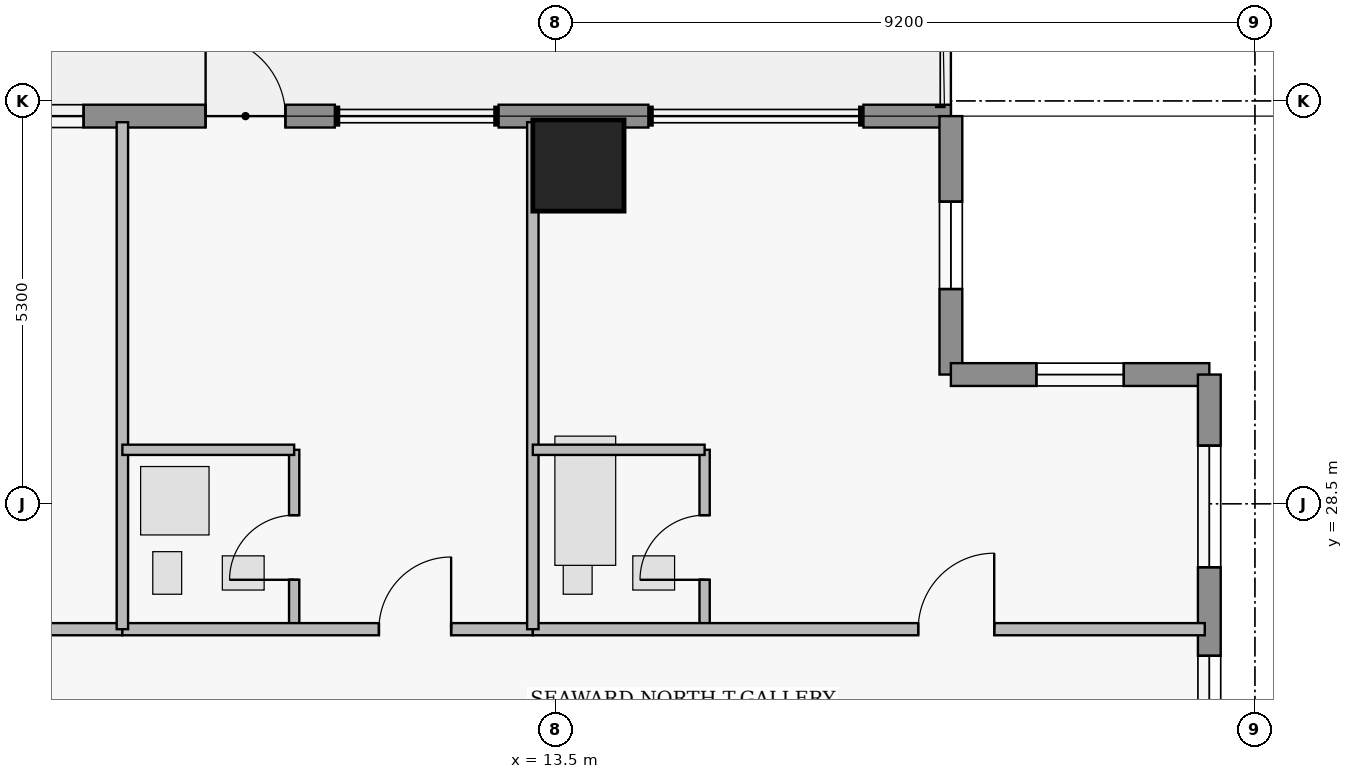
"""IFC4 building model, lengths in metres.
Left out: names, types, materials, properties, quantities, classifications, styles, units other than length and angle.
Written with IfcOpenShell. Run it as: python <this file> out.ifc"""

import sys

from ifc_helpers import new_model, si_unit, direction, frame, frame_2d, origin, origin_2d, place, context, subcontext, project, spatial, rectangle, extrude, element, fill, save


model = new_model("IFC4")
c1 = context("Model", 3, precision=1e-05, world=origin(), true_north=direction((0.0, 1.0)))
c2 = subcontext(c1, "Body", "Model", "MODEL_VIEW")
j1 = project(units=[si_unit("LENGTHUNIT", "METRE"), si_unit("PLANEANGLEUNIT", "RADIAN")], contexts=[c1])
p1 = place(None, origin())
s1 = spatial("IfcSite", under=j1, at=p1, CompositionType="ELEMENT")
p2 = place(p1, origin())
s2 = spatial("IfcBuilding", under=s1, at=p2, CompositionType="ELEMENT")
p3 = place(p2, frame((0.0, 0.0, 199.9)))
s3 = spatial("IfcBuildingStorey", under=s2, at=p3, CompositionType="ELEMENT", Elevation=199.9)
p4 = place(p3, frame((13.8, 32.95, 0.0), z_axis=(0.0, 0.0, 1.0), x_axis=(1.0, 0.0, 0.0)))
e1 = element("IfcColumn", 1, at=p4, inside=s3, PredefinedType="COLUMN", context=c2, shape_type="SweptSolid", body=[
    extrude(rectangle(XDim=1.2, YDim=1.2, at=origin_2d()), origin(), (0.0, 0.0, 1.0), 3.75),
])
p5 = place(p3, frame((-8.45, 33.6, 0.0), z_axis=(0.0, 0.0, 1.0), x_axis=(1.0, 0.0, 0.0)))
e2 = element("IfcWall", 2, at=p5, inside=s3, PredefinedType="STANDARD", context=c2, shape_type="SweptSolid", body=[
    extrude(rectangle(XDim=19.045, YDim=0.3, at=frame_2d((9.522, 0.0))), origin(), (0.0, 0.0, 1.0), 3.53),
])
p6 = place(p5, frame((17.345, 0.0, 0.0)))
e3 = element("IfcOpeningElement", 3, at=p6, cuts=e2, PredefinedType="OPENING", context=c2, shape_type="SweptSolid", body=[
    extrude(rectangle(XDim=1.05, YDim=2.2, at=frame_2d((0.525, 1.1))), frame((0.0, 0.16, 0.0), z_axis=(0.0, -1.0, 0.0), x_axis=(1.0, 0.0, 0.0)), (0.0, 0.0, 1.0), 0.32),
])
p7 = place(p5, frame((7.45, 0.0, 0.85)))
e4 = element("IfcOpeningElement", 4, at=p7, cuts=e2, PredefinedType="OPENING", context=c2, shape_type="SweptSolid", body=[
    extrude(rectangle(XDim=1.6, YDim=1.8, at=frame_2d((0.8, 0.9))), frame((0.0, 0.16, 0.0), z_axis=(0.0, -1.0, 0.0), x_axis=(1.0, 0.0, 0.0)), (0.0, 0.0, 1.0), 0.32),
])
p8 = place(p5, frame((1.06, 0.0, 0.85)))
e5 = element("IfcOpeningElement", 5, at=p8, cuts=e2, PredefinedType="OPENING", context=c2, shape_type="SweptSolid", body=[
    extrude(rectangle(XDim=1.6, YDim=1.8, at=frame_2d((0.8, 0.9))), frame((0.0, 0.16, 0.0), z_axis=(0.0, -1.0, 0.0), x_axis=(1.0, 0.0, 0.0)), (0.0, 0.0, 1.0), 0.32),
])
p9 = place(p5, frame((14.14, 0.0, 0.85)))
e6 = element("IfcOpeningElement", 6, at=p9, cuts=e2, PredefinedType="OPENING", context=c2, shape_type="SweptSolid", body=[
    extrude(rectangle(XDim=1.6, YDim=1.8, at=frame_2d((0.8, 0.9))), frame((0.0, 0.16, 0.0), z_axis=(0.0, -1.0, 0.0), x_axis=(1.0, 0.0, 0.0)), (0.0, 0.0, 1.0), 0.32),
])
p10 = place(p3, frame((12.75, 33.6, 0.0), z_axis=(0.0, 0.0, 1.0), x_axis=(1.0, 0.0, 0.0)))
e7 = element("IfcWall", 7, at=p10, inside=s3, PredefinedType="STANDARD", context=c2, shape_type="SweptSolid", body=[
    extrude(rectangle(XDim=1.97, YDim=0.3, at=frame_2d((0.985, 0.0))), origin(), (0.0, 0.0, 1.0), 3.53),
])
p11 = place(p3, frame((17.55, 33.6, 0.0), z_axis=(0.0, 0.0, 1.0), x_axis=(1.0, 0.0, 0.0)))
e8 = element("IfcWall", 8, at=p11, inside=s3, PredefinedType="STANDARD", context=c2, shape_type="SweptSolid", body=[
    extrude(rectangle(XDim=1.15, YDim=0.3, at=frame_2d((0.575, 0.0))), origin(), (0.0, 0.0, 1.0), 3.53),
])
p12 = place(p3, frame((18.7, 33.6, 0.0), z_axis=(0.0, 0.0, 1.0), x_axis=(0.0, -1.0, 0.0)))
e9 = element("IfcWall", 9, at=p12, inside=s3, PredefinedType="STANDARD", context=c2, shape_type="SweptSolid", body=[
    extrude(rectangle(XDim=3.4, YDim=0.3, at=frame_2d((1.7, 0.0))), origin(), (0.0, 0.0, 1.0), 3.53),
])
p13 = place(p12, frame((1.125, 0.0, 1.25)))
e10 = element("IfcOpeningElement", 10, at=p13, cuts=e9, PredefinedType="OPENING", context=c2, shape_type="SweptSolid", body=[
    extrude(rectangle(XDim=1.15, YDim=1.55, at=frame_2d((0.575, 0.775))), frame((0.0, 0.16, 0.0), z_axis=(0.0, -1.0, 0.0), x_axis=(1.0, 0.0, 0.0)), (0.0, 0.0, 1.0), 0.32),
])
p14 = place(p3, frame((18.7, 30.2, 0.0), z_axis=(0.0, 0.0, 1.0), x_axis=(1.0, 0.0, 0.0)))
e11 = element("IfcWall", 11, at=p14, inside=s3, PredefinedType="STANDARD", context=c2, shape_type="SweptSolid", body=[
    extrude(rectangle(XDim=3.4, YDim=0.3, at=frame_2d((1.7, 0.0))), origin(), (0.0, 0.0, 1.0), 3.53),
])
p15 = place(p14, frame((1.125, 0.0, 1.25)))
e12 = element("IfcOpeningElement", 12, at=p15, cuts=e11, PredefinedType="OPENING", context=c2, shape_type="SweptSolid", body=[
    extrude(rectangle(XDim=1.15, YDim=1.55, at=frame_2d((0.575, 0.775))), frame((0.0, 0.16, 0.0), z_axis=(0.0, -1.0, 0.0), x_axis=(1.0, 0.0, 0.0)), (0.0, 0.0, 1.0), 0.32),
])
p16 = place(p3, frame((22.1, 30.2, 0.0), z_axis=(0.0, 0.0, 1.0), x_axis=(0.0, -1.0, 0.0)))
e13 = element("IfcWall", 13, at=p16, inside=s3, PredefinedType="STANDARD", context=c2, shape_type="SweptSolid", body=[
    extrude(rectangle(XDim=5.65, YDim=0.3, at=frame_2d((2.825, 0.0))), origin(), (0.0, 0.0, 1.0), 3.53),
])
p17 = place(p16, frame((0.935, 0.0, 0.85)))
e14 = element("IfcOpeningElement", 14, at=p17, cuts=e13, PredefinedType="OPENING", context=c2, shape_type="SweptSolid", body=[
    extrude(rectangle(XDim=1.6, YDim=1.8, at=frame_2d((0.8, 0.9))), frame((0.0, 0.16, 0.0), z_axis=(0.0, -1.0, 0.0), x_axis=(1.0, 0.0, 0.0)), (0.0, 0.0, 1.0), 0.32),
])
p18 = place(p16, frame((3.7, 0.0, 0.95)))
e15 = element("IfcOpeningElement", 15, at=p18, cuts=e13, PredefinedType="OPENING", context=c2, shape_type="SweptSolid", body=[
    extrude(rectangle(XDim=1.15, YDim=1.55, at=frame_2d((0.575, 0.775))), frame((0.0, 0.16, 0.0), z_axis=(0.0, -1.0, 0.0), x_axis=(1.0, 0.0, 0.0)), (0.0, 0.0, 1.0), 0.32),
])
p19 = place(p3, frame((2.4, 26.85, 0.0), z_axis=(0.0, 0.0, 1.0), x_axis=(1.0, 0.0, 0.0)))
e16 = element("IfcWall", 16, at=p19, inside=s3, PredefinedType="PARTITIONING", context=c2, shape_type="SweptSolid", body=[
    extrude(rectangle(XDim=5.4, YDim=0.16, at=frame_2d((2.7, 0.0))), origin(), (0.0, 0.0, 1.0), 3.53),
])
p20 = place(p19, frame((3.375, 0.0, 0.0)))
e17 = element("IfcOpeningElement", 17, at=p20, cuts=e16, PredefinedType="OPENING", context=c2, shape_type="SweptSolid", body=[
    extrude(rectangle(XDim=0.95, YDim=2.15, at=frame_2d((0.475, 1.075))), frame((0.0, 0.09, 0.0), z_axis=(0.0, -1.0, 0.0), x_axis=(1.0, 0.0, 0.0)), (0.0, 0.0, 1.0), 0.18),
])
p21 = place(p3, frame((10.06, 26.85, 0.0), z_axis=(0.0, 0.0, 1.0), x_axis=(0.0, 1.0, 0.0)))
e18 = element("IfcWall", 18, at=p21, inside=s3, PredefinedType="PLUMBINGWALL", context=c2, shape_type="SweptSolid", body=[
    extrude(rectangle(XDim=2.36, YDim=0.135, at=frame_2d((1.18, 0.0))), origin(), (0.0, 0.0, 1.0), 3.53),
])
p22 = place(p21, frame((0.65, 0.0, 0.0)))
e19 = element("IfcOpeningElement", 19, at=p22, cuts=e18, PredefinedType="OPENING", context=c2, shape_type="SweptSolid", body=[
    extrude(rectangle(XDim=0.85, YDim=2.1, at=frame_2d((0.425, 1.05))), frame((0.0, 0.077, 0.0), z_axis=(0.0, -1.0, 0.0), x_axis=(1.0, 0.0, 0.0)), (0.0, 0.0, 1.0), 0.155),
])
p23 = place(p3, frame((7.8, 26.85, 0.0), z_axis=(0.0, 0.0, 1.0), x_axis=(1.0, 0.0, 0.0)))
e20 = element("IfcWall", 20, at=p23, inside=s3, PredefinedType="PARTITIONING", context=c2, shape_type="SweptSolid", body=[
    extrude(rectangle(XDim=5.4, YDim=0.16, at=frame_2d((2.7, 0.0))), origin(), (0.0, 0.0, 1.0), 3.53),
])
p24 = place(p23, frame((3.375, 0.0, 0.0)))
e21 = element("IfcOpeningElement", 21, at=p24, cuts=e20, PredefinedType="OPENING", context=c2, shape_type="SweptSolid", body=[
    extrude(rectangle(XDim=0.95, YDim=2.15, at=frame_2d((0.475, 1.075))), frame((0.0, 0.09, 0.0), z_axis=(0.0, -1.0, 0.0), x_axis=(1.0, 0.0, 0.0)), (0.0, 0.0, 1.0), 0.18),
])
p25 = place(p3, frame((15.46, 26.85, 0.0), z_axis=(0.0, 0.0, 1.0), x_axis=(0.0, 1.0, 0.0)))
e22 = element("IfcWall", 22, at=p25, inside=s3, PredefinedType="PLUMBINGWALL", context=c2, shape_type="SweptSolid", body=[
    extrude(rectangle(XDim=2.36, YDim=0.135, at=frame_2d((1.18, 0.0))), origin(), (0.0, 0.0, 1.0), 3.53),
])
p26 = place(p25, frame((0.65, 0.0, 0.0)))
e23 = element("IfcOpeningElement", 23, at=p26, cuts=e22, PredefinedType="OPENING", context=c2, shape_type="SweptSolid", body=[
    extrude(rectangle(XDim=0.85, YDim=2.1, at=frame_2d((0.425, 1.05))), frame((0.0, 0.077, 0.0), z_axis=(0.0, -1.0, 0.0), x_axis=(1.0, 0.0, 0.0)), (0.0, 0.0, 1.0), 0.155),
])
p27 = place(p3, frame((13.2, 26.85, 0.0), z_axis=(0.0, 0.0, 1.0), x_axis=(1.0, 0.0, 0.0)))
e24 = element("IfcWall", 24, at=p27, inside=s3, PredefinedType="PARTITIONING", context=c2, shape_type="SweptSolid", body=[
    extrude(rectangle(XDim=8.84, YDim=0.16, at=frame_2d((4.42, 0.0))), origin(), (0.0, 0.0, 1.0), 3.53),
])
p28 = place(p27, frame((5.07, 0.0, 0.0)))
e25 = element("IfcOpeningElement", 25, at=p28, cuts=e24, PredefinedType="OPENING", context=c2, shape_type="SweptSolid", body=[
    extrude(rectangle(XDim=1.0, YDim=2.15, at=frame_2d((0.5, 1.075))), frame((0.0, 0.09, 0.0), z_axis=(0.0, -1.0, 0.0), x_axis=(1.0, 0.0, 0.0)), (0.0, 0.0, 1.0), 0.18),
])
p29 = place(p3, frame((7.8, 26.85, 0.0), z_axis=(0.0, 0.0, 1.0), x_axis=(0.0, 1.0, 0.0)))
e26 = element("IfcWall", 26, at=p29, inside=s3, PredefinedType="PARTITIONING", context=c2, shape_type="SweptSolid", body=[
    extrude(rectangle(XDim=6.67, YDim=0.15, at=frame_2d((3.335, 0.0))), origin(), (0.0, 0.0, 1.0), 3.53),
])
p30 = place(p3, frame((7.8, 29.21, 0.0), z_axis=(0.0, 0.0, 1.0), x_axis=(1.0, 0.0, 0.0)))
e27 = element("IfcWall", 27, at=p30, inside=s3, PredefinedType="PLUMBINGWALL", context=c2, shape_type="SweptSolid", body=[
    extrude(rectangle(XDim=2.26, YDim=0.135, at=frame_2d((1.13, 0.0))), origin(), (0.0, 0.0, 1.0), 3.53),
])
p31 = place(p3, frame((13.2, 26.85, 0.0), z_axis=(0.0, 0.0, 1.0), x_axis=(0.0, 1.0, 0.0)))
e28 = element("IfcWall", 28, at=p31, inside=s3, PredefinedType="PARTITIONING", context=c2, shape_type="SweptSolid", body=[
    extrude(rectangle(XDim=6.67, YDim=0.15, at=frame_2d((3.335, 0.0))), origin(), (0.0, 0.0, 1.0), 3.53),
])
p32 = place(p3, frame((13.2, 29.21, 0.0), z_axis=(0.0, 0.0, 1.0), x_axis=(1.0, 0.0, 0.0)))
e29 = element("IfcWall", 29, at=p32, inside=s3, PredefinedType="PLUMBINGWALL", context=c2, shape_type="SweptSolid", body=[
    extrude(rectangle(XDim=2.26, YDim=0.135, at=frame_2d((1.13, 0.0))), origin(), (0.0, 0.0, 1.0), 3.53),
])
p33 = place(p6, origin())
e30 = element("IfcDoor", 30, at=p33, inside=s3, OperationType="SINGLE_SWING_LEFT", PredefinedType="DOOR", context=c2, shape_type="SweptSolid", body=[
    extrude(rectangle(XDim=1.05, YDim=2.2, at=frame_2d((0.525, 1.1))), frame((0.0, 0.025, 0.0), z_axis=(0.0, -1.0, 0.0), x_axis=(1.0, 0.0, 0.0)), (0.0, 0.0, 1.0), 0.05),
])
fill(e3, e30)
p34 = place(p9, origin())
e31 = element("IfcWindow", 31, at=p34, inside=s3, PartitioningType="SINGLE_PANEL", PredefinedType="WINDOW", context=c2, shape_type="SweptSolid", body=[
    extrude(rectangle(XDim=1.6, YDim=1.8, at=frame_2d((0.8, 0.9))), frame((0.0, 0.03, 0.0), z_axis=(0.0, -1.0, 0.0), x_axis=(1.0, 0.0, 0.0)), (0.0, 0.0, 1.0), 0.06),
])
fill(e6, e31)
p35 = place(p13, origin())
e32 = element("IfcWindow", 32, at=p35, inside=s3, PartitioningType="SINGLE_PANEL", PredefinedType="WINDOW", context=c2, shape_type="SweptSolid", body=[
    extrude(rectangle(XDim=1.15, YDim=1.55, at=frame_2d((0.575, 0.775))), frame((0.0, 0.03, 0.0), z_axis=(0.0, -1.0, 0.0), x_axis=(1.0, 0.0, 0.0)), (0.0, 0.0, 1.0), 0.06),
])
fill(e10, e32)
p36 = place(p15, origin())
e33 = element("IfcWindow", 33, at=p36, inside=s3, PartitioningType="SINGLE_PANEL", PredefinedType="WINDOW", context=c2, shape_type="SweptSolid", body=[
    extrude(rectangle(XDim=1.15, YDim=1.55, at=frame_2d((0.575, 0.775))), frame((0.0, 0.03, 0.0), z_axis=(0.0, -1.0, 0.0), x_axis=(1.0, 0.0, 0.0)), (0.0, 0.0, 1.0), 0.06),
])
fill(e12, e33)
p37 = place(p17, origin())
e34 = element("IfcWindow", 34, at=p37, inside=s3, PartitioningType="SINGLE_PANEL", PredefinedType="WINDOW", context=c2, shape_type="SweptSolid", body=[
    extrude(rectangle(XDim=1.6, YDim=1.8, at=frame_2d((0.8, 0.9))), frame((0.0, 0.03, 0.0), z_axis=(0.0, -1.0, 0.0), x_axis=(1.0, 0.0, 0.0)), (0.0, 0.0, 1.0), 0.06),
])
fill(e14, e34)
p38 = place(p18, origin())
e35 = element("IfcWindow", 35, at=p38, inside=s3, PartitioningType="SINGLE_PANEL", PredefinedType="WINDOW", context=c2, shape_type="SweptSolid", body=[
    extrude(rectangle(XDim=1.15, YDim=1.55, at=frame_2d((0.575, 0.775))), frame((0.0, 0.03, 0.0), z_axis=(0.0, -1.0, 0.0), x_axis=(1.0, 0.0, 0.0)), (0.0, 0.0, 1.0), 0.06),
])
fill(e15, e35)
p39 = place(p22, origin())
e36 = element("IfcDoor", 36, at=p39, inside=s3, OperationType="SINGLE_SWING_LEFT", PredefinedType="DOOR", context=c2, shape_type="SweptSolid", body=[
    extrude(rectangle(XDim=0.85, YDim=2.1, at=frame_2d((0.425, 1.05))), frame((0.0, 0.025, 0.0), z_axis=(0.0, -1.0, 0.0), x_axis=(1.0, 0.0, 0.0)), (0.0, 0.0, 1.0), 0.05),
])
fill(e19, e36)
p40 = place(p24, origin())
e37 = element("IfcDoor", 37, at=p40, inside=s3, OperationType="SINGLE_SWING_RIGHT", PredefinedType="DOOR", context=c2, shape_type="SweptSolid", body=[
    extrude(rectangle(XDim=0.95, YDim=2.15, at=frame_2d((0.475, 1.075))), frame((0.0, 0.025, 0.0), z_axis=(0.0, -1.0, 0.0), x_axis=(1.0, 0.0, 0.0)), (0.0, 0.0, 1.0), 0.05),
])
fill(e21, e37)
p41 = place(p26, origin())
e38 = element("IfcDoor", 38, at=p41, inside=s3, OperationType="SINGLE_SWING_LEFT", PredefinedType="DOOR", context=c2, shape_type="SweptSolid", body=[
    extrude(rectangle(XDim=0.85, YDim=2.1, at=frame_2d((0.425, 1.05))), frame((0.0, 0.025, 0.0), z_axis=(0.0, -1.0, 0.0), x_axis=(1.0, 0.0, 0.0)), (0.0, 0.0, 1.0), 0.05),
])
fill(e23, e38)
p42 = place(p28, origin())
e39 = element("IfcDoor", 39, at=p42, inside=s3, OperationType="SINGLE_SWING_RIGHT", PredefinedType="DOOR", context=c2, shape_type="SweptSolid", body=[
    extrude(rectangle(XDim=1.0, YDim=2.15, at=frame_2d((0.5, 1.075))), frame((0.0, 0.025, 0.0), z_axis=(0.0, -1.0, 0.0), x_axis=(1.0, 0.0, 0.0)), (0.0, 0.0, 1.0), 0.05),
])
fill(e25, e39)
save(model, sys.argv[1])
